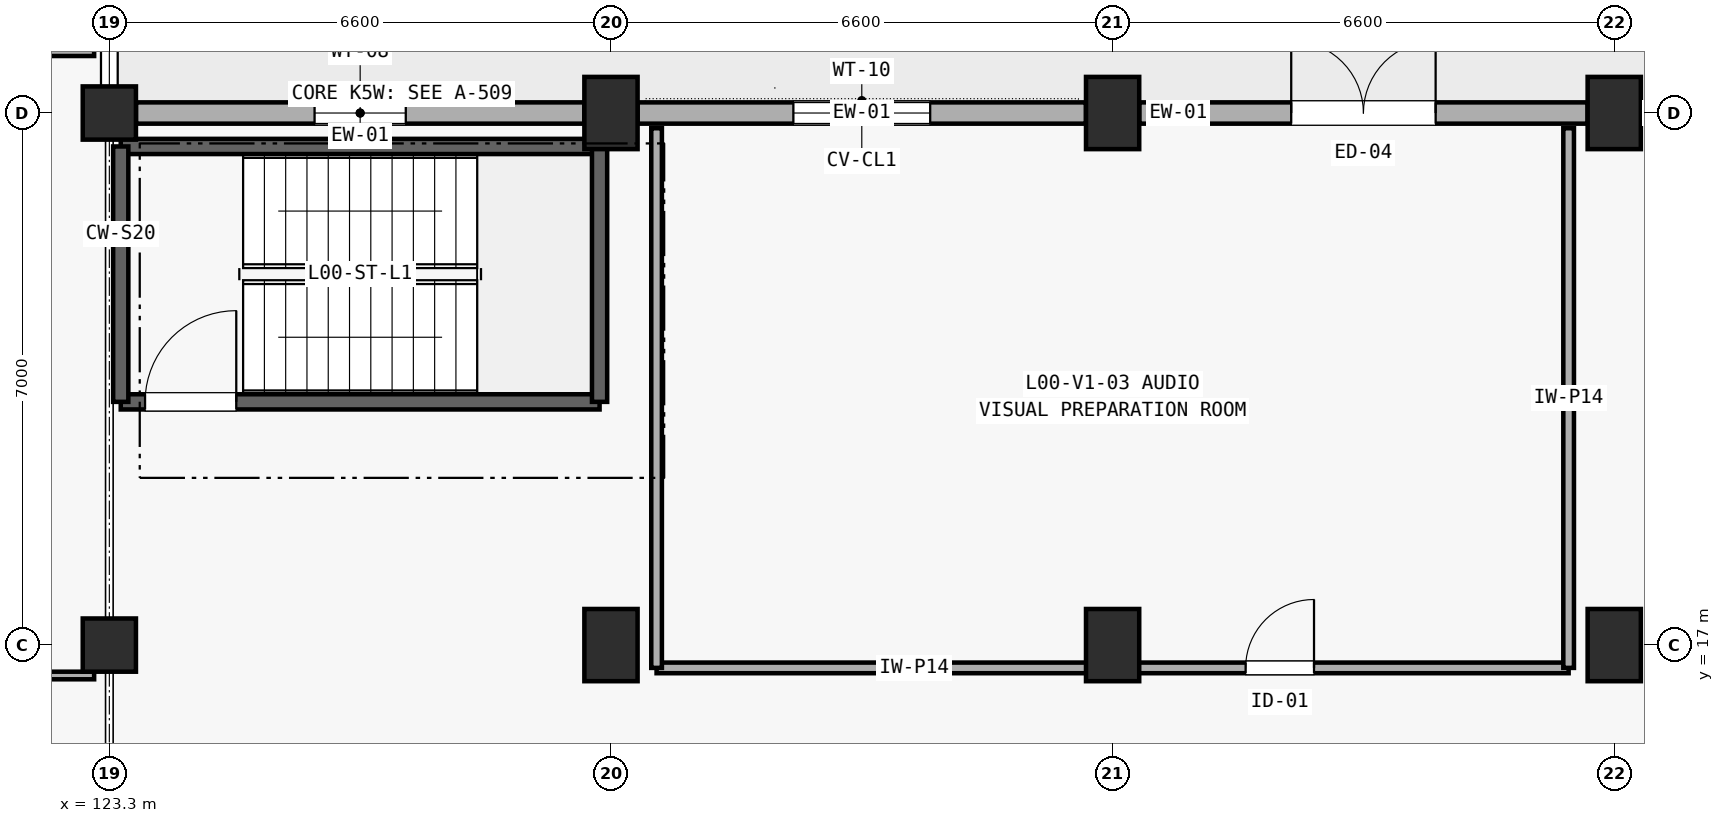
"""IFC4 building model, lengths in metres.
Left out: names, types, materials, properties, quantities, classifications, styles, units other than length and angle.
Written with IfcOpenShell. Run it as: python <this file> out.ifc"""

import sys

from ifc_helpers import new_model, si_unit, direction, frame, frame_2d, origin, origin_2d, place, context, subcontext, project, spatial, rectangle, extrude, element, fill, save


model = new_model("IFC4")
c1 = context("Model", 3, precision=1e-05, world=origin(), true_north=direction((0.0, 1.0)))
c2 = subcontext(c1, "Body", "Model", "MODEL_VIEW")
j1 = project(units=[si_unit("LENGTHUNIT", "METRE"), si_unit("PLANEANGLEUNIT", "RADIAN")], contexts=[c1])
p1 = place(None, origin())
s1 = spatial("IfcSite", under=j1, at=p1, CompositionType="ELEMENT")
p2 = place(p1, origin())
s2 = spatial("IfcBuilding", under=s1, at=p2, CompositionType="ELEMENT")
p3 = place(p2, origin())
s3 = spatial("IfcBuildingStorey", under=s2, at=p3, CompositionType="ELEMENT", Elevation=0.0)
for number, where, z_axis, x_axis in (
    (1, (123.3, 17.0, 0.0), (0.0, 0.0, 1.0), (1.0, 0.0, 0.0)),
    (2, (123.3, 24.0, 0.0), (0.0, 0.0, 1.0), (1.0, 0.0, 0.0)),
):
    element("IfcColumn", number, at=place(p3, frame(where, z_axis=z_axis, x_axis=x_axis)), inside=s3, PredefinedType="COLUMN", context=c2, shape_type="SweptSolid", body=[
        extrude(rectangle(XDim=0.7, YDim=0.7, at=origin_2d()), origin(), (0.0, 0.0, 1.0), 4.2),
    ])
for number, where, z_axis, x_axis in (
    (3, (129.9, 17.0, 0.0), (0.0, 0.0, 1.0), (1.0, 0.0, 0.0)),
    (4, (129.9, 24.0, 0.0), (0.0, 0.0, 1.0), (1.0, 0.0, 0.0)),
    (5, (136.5, 17.0, 0.0), (0.0, 0.0, 1.0), (1.0, 0.0, 0.0)),
    (6, (136.5, 24.0, 0.0), (0.0, 0.0, 1.0), (1.0, 0.0, 0.0)),
    (7, (143.1, 17.0, 0.0), (0.0, 0.0, 1.0), (1.0, 0.0, 0.0)),
    (8, (143.1, 24.0, 0.0), (0.0, 0.0, 1.0), (1.0, 0.0, 0.0)),
):
    element("IfcColumn", number, at=place(p3, frame(where, z_axis=z_axis, x_axis=x_axis)), inside=s3, PredefinedType="COLUMN", context=c2, shape_type="SweptSolid", body=[
        extrude(rectangle(XDim=0.7, YDim=0.95, at=origin_2d()), origin(), (0.0, 0.0, 1.0), 4.2),
    ])
p4 = place(p3, frame((123.65, 24.0, 0.0), z_axis=(0.0, 0.0, 1.0), x_axis=(1.0, 0.0, 0.0)))
e9 = element("IfcWall", 9, at=p4, inside=s3, PredefinedType="SOLIDWALL", context=c2, shape_type="SweptSolid", body=[
    extrude(rectangle(XDim=5.9, YDim=0.28, at=frame_2d((2.95, 0.0))), origin(), (0.0, 0.0, 1.0), 3.385),
])
p5 = place(p4, frame((2.35, 0.0, 0.85)))
e10 = element("IfcOpeningElement", 10, at=p5, cuts=e9, PredefinedType="OPENING", context=c2, shape_type="SweptSolid", body=[
    extrude(rectangle(XDim=1.2, YDim=1.5, at=frame_2d((0.6, 0.75))), frame((0.0, 0.15, 0.0), z_axis=(0.0, -1.0, 0.0), x_axis=(1.0, 0.0, 0.0)), (0.0, 0.0, 1.0), 0.3),
])
p6 = place(p3, frame((130.25, 24.0, 0.0), z_axis=(0.0, 0.0, 1.0), x_axis=(1.0, 0.0, 0.0)))
e11 = element("IfcWall", 11, at=p6, inside=s3, PredefinedType="SOLIDWALL", context=c2, shape_type="SweptSolid", body=[
    extrude(rectangle(XDim=5.9, YDim=0.28, at=frame_2d((2.95, 0.0))), origin(), (0.0, 0.0, 1.0), 3.345),
])
p7 = place(p6, frame((2.05, 0.0, 0.85)))
e12 = element("IfcOpeningElement", 12, at=p7, cuts=e11, PredefinedType="OPENING", context=c2, shape_type="SweptSolid", body=[
    extrude(rectangle(XDim=1.8, YDim=1.5, at=frame_2d((0.9, 0.75))), frame((0.0, 0.15, 0.0), z_axis=(0.0, -1.0, 0.0), x_axis=(1.0, 0.0, 0.0)), (0.0, 0.0, 1.0), 0.3),
])
p8 = place(p3, frame((136.85, 24.0, 0.0), z_axis=(0.0, 0.0, 1.0), x_axis=(1.0, 0.0, 0.0)))
e13 = element("IfcWall", 13, at=p8, inside=s3, PredefinedType="SOLIDWALL", context=c2, shape_type="SweptSolid", body=[
    extrude(rectangle(XDim=5.9, YDim=0.28, at=frame_2d((2.95, 0.0))), origin(), (0.0, 0.0, 1.0), 3.345),
])
p9 = place(p8, frame((2.0, 0.0, 0.0)))
e14 = element("IfcOpeningElement", 14, at=p9, cuts=e13, PredefinedType="OPENING", context=c2, shape_type="SweptSolid", body=[
    extrude(rectangle(XDim=1.9, YDim=2.2, at=frame_2d((0.95, 1.1))), frame((0.0, 0.15, 0.0), z_axis=(0.0, -1.0, 0.0), x_axis=(1.0, 0.0, 0.0)), (0.0, 0.0, 1.0), 0.3),
])
p10 = place(p3, frame((143.45, 24.0, 0.0), z_axis=(0.0, 0.0, 1.0), x_axis=(1.0, 0.0, 0.0)))
e15 = element("IfcWall", 15, at=p10, inside=s3, PredefinedType="SOLIDWALL", context=c2, shape_type="SweptSolid", body=[
    extrude(rectangle(XDim=5.9, YDim=0.28, at=frame_2d((2.95, 0.0))), origin(), (0.0, 0.0, 1.0), 3.135),
])
p11 = place(p10, frame((1.85, 0.0, 0.0)))
e16 = element("IfcOpeningElement", 16, at=p11, cuts=e15, PredefinedType="OPENING", context=c2, shape_type="SweptSolid", body=[
    extrude(rectangle(XDim=2.2, YDim=2.2, at=frame_2d((1.1, 1.1))), frame((0.0, 0.15, 0.0), z_axis=(0.0, -1.0, 0.0), x_axis=(1.0, 0.0, 0.0)), (0.0, 0.0, 1.0), 0.3),
])
p12 = place(p3, frame((123.45, 20.2, 0.0), z_axis=(0.0, 0.0, 1.0), x_axis=(1.0, 0.0, 0.0)))
e17 = element("IfcWall", 17, at=p12, inside=s3, PredefinedType="SHEAR", context=c2, shape_type="SweptSolid", body=[
    extrude(rectangle(XDim=6.3, YDim=0.2, at=frame_2d((3.15, 0.0))), origin(), (0.0, 0.0, 1.0), 4.2),
])
p13 = place(p12, frame((0.32, 0.0, 0.0)))
e18 = element("IfcOpeningElement", 18, at=p13, cuts=e17, PredefinedType="OPENING", context=c2, shape_type="SweptSolid", body=[
    extrude(rectangle(XDim=1.2, YDim=2.15, at=frame_2d((0.6, 1.075))), frame((0.0, 0.11, 0.0), z_axis=(0.0, -1.0, 0.0), x_axis=(1.0, 0.0, 0.0)), (0.0, 0.0, 1.0), 0.22),
])
p14 = place(p3, frame((123.45, 23.56, 0.0), z_axis=(0.0, 0.0, 1.0), x_axis=(1.0, 0.0, 0.0)))
e19 = element("IfcWall", 19, at=p14, inside=s3, PredefinedType="SHEAR", context=c2, shape_type="SweptSolid", body=[
    extrude(rectangle(XDim=6.3, YDim=0.2, at=frame_2d((3.15, 0.0))), origin(), (0.0, 0.0, 1.0), 4.2),
])
for number, where, z_axis, x_axis in (
    (20, (123.45, 20.2, 0.0), (0.0, 0.0, 1.0), (0.0, 1.0, 0.0)),
    (21, (129.75, 20.2, 0.0), (0.0, 0.0, 1.0), (0.0, 1.0, 0.0)),
):
    element("IfcWall", number, at=place(p3, frame(where, z_axis=z_axis, x_axis=x_axis)), inside=s3, PredefinedType="SHEAR", context=c2, shape_type="SweptSolid", body=[
        extrude(rectangle(XDim=3.36, YDim=0.2, at=frame_2d((1.68, 0.0))), origin(), (0.0, 0.0, 1.0), 4.2),
    ])
p15 = place(p3, frame((130.5, 16.7, 0.0), z_axis=(0.0, 0.0, 1.0), x_axis=(1.0, 0.0, 0.0)))
e22 = element("IfcWall", 22, at=p15, inside=s3, PredefinedType="PLUMBINGWALL", context=c2, shape_type="SweptSolid", body=[
    extrude(rectangle(XDim=12.0, YDim=0.14, at=frame_2d((6.0, 0.0))), origin(), (0.0, 0.0, 1.0), 3.345),
])
p16 = place(p15, frame((7.75, 0.0, 0.0)))
e23 = element("IfcOpeningElement", 23, at=p16, cuts=e22, PredefinedType="OPENING", context=c2, shape_type="SweptSolid", body=[
    extrude(rectangle(XDim=0.9, YDim=2.1, at=frame_2d((0.45, 1.05))), frame((0.0, 0.08, 0.0), z_axis=(0.0, -1.0, 0.0), x_axis=(1.0, 0.0, 0.0)), (0.0, 0.0, 1.0), 0.16),
])
for number, where, z_axis, x_axis in (
    (24, (130.5, 16.7, 0.0), (0.0, 0.0, 1.0), (0.0, 1.0, 0.0)),
    (25, (142.5, 16.7, 0.0), (0.0, 0.0, 1.0), (0.0, 1.0, 0.0)),
):
    element("IfcWall", number, at=place(p3, frame(where, z_axis=z_axis, x_axis=x_axis)), inside=s3, PredefinedType="PLUMBINGWALL", context=c2, shape_type="SweptSolid", body=[
        extrude(rectangle(XDim=7.1, YDim=0.14, at=frame_2d((3.55, 0.0))), origin(), (0.0, 0.0, 1.0), 3.9),
    ])
p17 = place(p3, frame((106.5, 16.6, 0.0), z_axis=(0.0, 0.0, 1.0), x_axis=(1.0, 0.0, 0.0)))
e26 = element("IfcWall", 26, at=p17, inside=s3, PredefinedType="PARTITIONING", context=c2, shape_type="SweptSolid", body=[
    extrude(rectangle(XDim=16.6, YDim=0.1, at=frame_2d((8.3, 0.0))), origin(), (0.0, 0.0, 1.0), 3.9),
])
p18 = place(p3, frame((106.5, 24.8, 0.0), z_axis=(0.0, 0.0, 1.0), x_axis=(1.0, 0.0, 0.0)))
e27 = element("IfcWall", 27, at=p18, inside=s3, PredefinedType="PARTITIONING", context=c2, shape_type="SweptSolid", body=[
    extrude(rectangle(XDim=16.6, YDim=0.1, at=frame_2d((8.3, 0.0))), origin(), (0.0, 0.0, 1.0), 3.9),
])
p19 = place(p18, frame((7.425, 0.0, 0.0)))
e28 = element("IfcOpeningElement", 28, at=p19, cuts=e27, PredefinedType="OPENING", context=c2, shape_type="SweptSolid", body=[
    extrude(rectangle(XDim=1.35, YDim=2.2, at=frame_2d((0.675, 1.1))), frame((0.0, 0.06, 0.0), z_axis=(0.0, -1.0, 0.0), x_axis=(1.0, 0.0, 0.0)), (0.0, 0.0, 1.0), 0.12),
])
p20 = place(p5, origin())
e29 = element("IfcWindow", 29, at=p20, inside=s3, PartitioningType="SINGLE_PANEL", PredefinedType="WINDOW", context=c2, shape_type="SweptSolid", body=[
    extrude(rectangle(XDim=1.2, YDim=1.5, at=frame_2d((0.6, 0.75))), frame((0.0, 0.03, 0.0), z_axis=(0.0, -1.0, 0.0), x_axis=(1.0, 0.0, 0.0)), (0.0, 0.0, 1.0), 0.06),
])
fill(e10, e29)
p21 = place(p7, origin())
e30 = element("IfcWindow", 30, at=p21, inside=s3, PartitioningType="SINGLE_PANEL", PredefinedType="WINDOW", context=c2, shape_type="SweptSolid", body=[
    extrude(rectangle(XDim=1.8, YDim=1.5, at=frame_2d((0.9, 0.75))), frame((0.0, 0.03, 0.0), z_axis=(0.0, -1.0, 0.0), x_axis=(1.0, 0.0, 0.0)), (0.0, 0.0, 1.0), 0.06),
])
fill(e12, e30)
p22 = place(p9, origin())
e31 = element("IfcDoor", 31, at=p22, inside=s3, OperationType="DOUBLE_DOOR_SINGLE_SWING", PredefinedType="DOOR", context=c2, shape_type="SweptSolid", body=[
    extrude(rectangle(XDim=1.9, YDim=2.2, at=frame_2d((0.95, 1.1))), frame((0.0, 0.025, 0.0), z_axis=(0.0, -1.0, 0.0), x_axis=(1.0, 0.0, 0.0)), (0.0, 0.0, 1.0), 0.05),
])
fill(e14, e31)
p23 = place(p13, origin())
e32 = element("IfcDoor", 32, at=p23, inside=s3, OperationType="SINGLE_SWING_RIGHT", PredefinedType="DOOR", context=c2, shape_type="SweptSolid", body=[
    extrude(rectangle(XDim=1.2, YDim=2.15, at=frame_2d((0.6, 1.075))), frame((0.0, 0.025, 0.0), z_axis=(0.0, -1.0, 0.0), x_axis=(1.0, 0.0, 0.0)), (0.0, 0.0, 1.0), 0.05),
])
fill(e18, e32)
p24 = place(p16, origin())
e33 = element("IfcDoor", 33, at=p24, inside=s3, OperationType="SINGLE_SWING_RIGHT", PredefinedType="DOOR", context=c2, shape_type="SweptSolid", body=[
    extrude(rectangle(XDim=0.9, YDim=2.1, at=frame_2d((0.45, 1.05))), frame((0.0, 0.025, 0.0), z_axis=(0.0, -1.0, 0.0), x_axis=(1.0, 0.0, 0.0)), (0.0, 0.0, 1.0), 0.05),
])
fill(e23, e33)
save(model, sys.argv[1])
